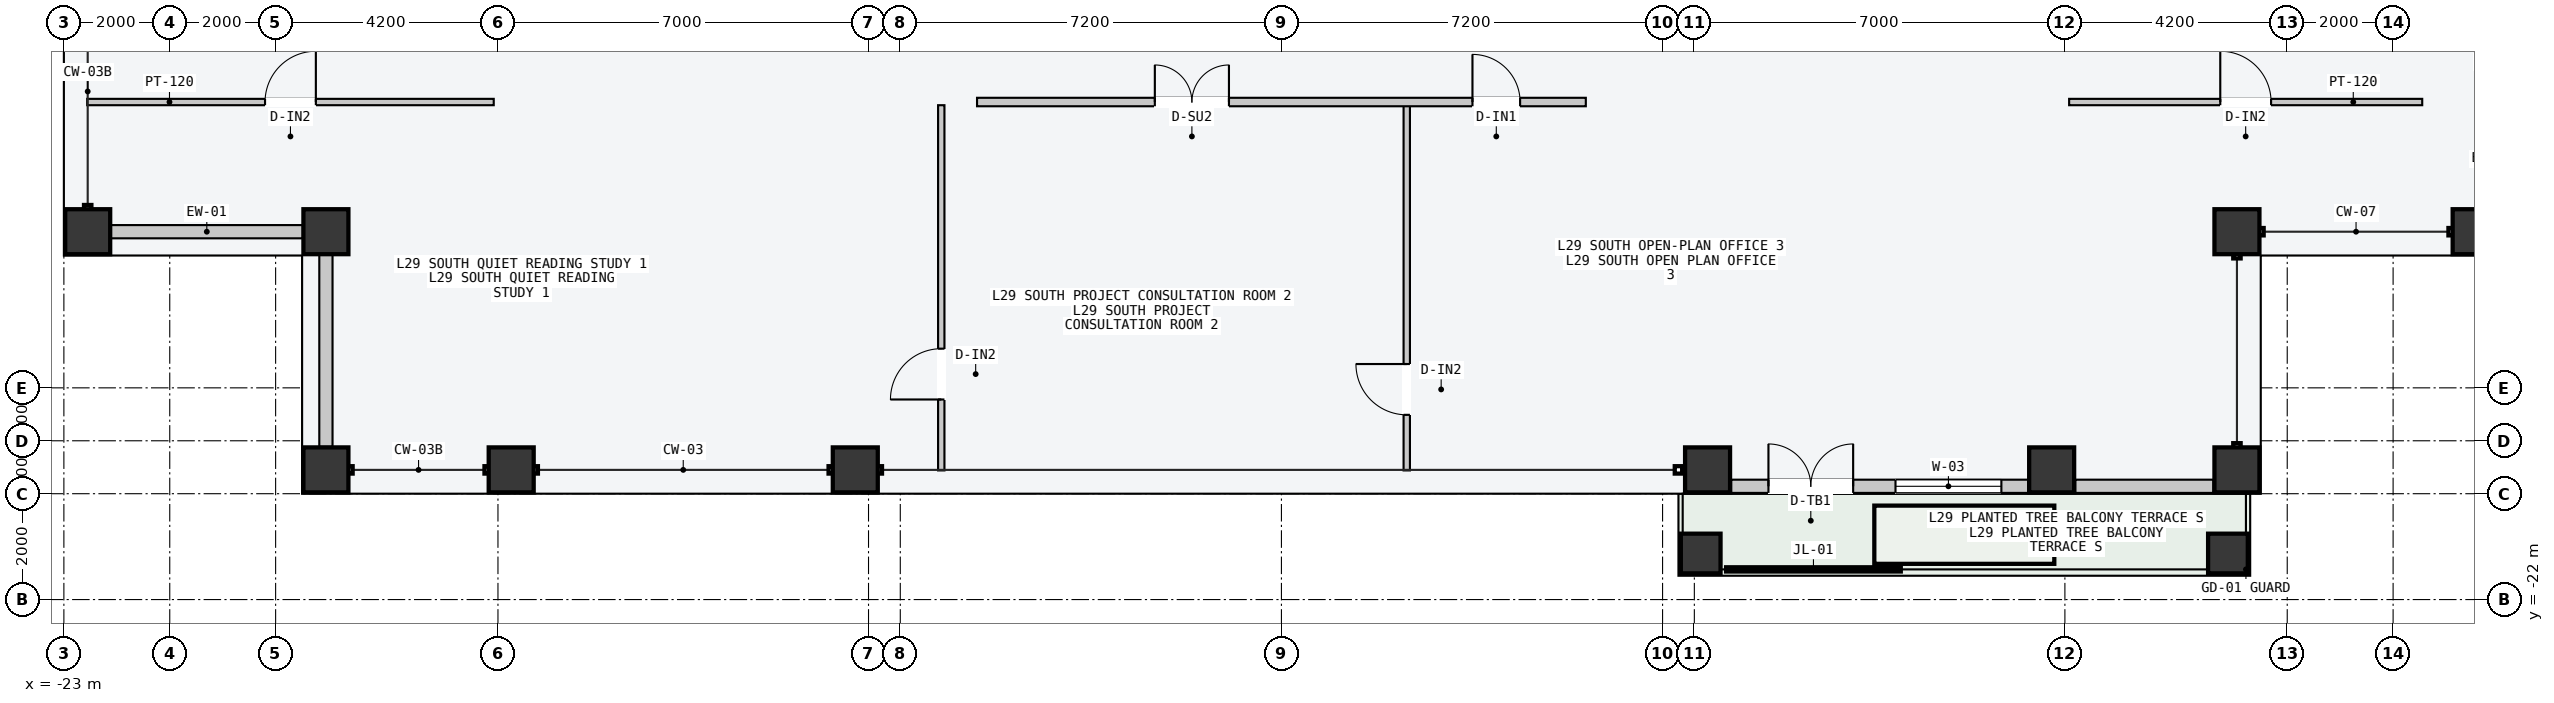
"""IFC4 building model, lengths in metres.
Left out: names, types, materials, properties, quantities, classifications, styles, units other than length and angle.
Written with IfcOpenShell. Run it as: python <this file> out.ifc"""

import sys

from ifc_helpers import new_model, si_unit, direction, frame, frame_2d, origin, origin_2d, place, context, subcontext, project, spatial, rectangle, hollow_rectangle, extrude, element, fill, save


model = new_model("IFC4")
c1 = context("Model", 3, precision=1e-05, world=origin(), true_north=direction((0.0, 1.0)))
c2 = subcontext(c1, "Body", "Model", "MODEL_VIEW")
j1 = project(units=[si_unit("LENGTHUNIT", "METRE"), si_unit("PLANEANGLEUNIT", "RADIAN")], contexts=[c1])
p1 = place(None, origin())
s1 = spatial("IfcSite", under=j1, at=p1, CompositionType="ELEMENT")
p2 = place(p1, origin())
s2 = spatial("IfcBuilding", under=s1, at=p2, CompositionType="ELEMENT")
p3 = place(p2, frame((0.0, 0.0, 113.4)))
s3 = spatial("IfcBuildingStorey", under=s2, at=p3, CompositionType="ELEMENT", Elevation=113.4)
for number, where, z_axis, x_axis in (
    (1, (-18.05, -19.55, 0.0), (0.0, 0.0, 1.0), (1.0, 0.0, 0.0)),
    (2, (-14.55, -19.55, 0.0), (0.0, 0.0, 1.0), (1.0, 0.0, 0.0)),
    (3, (-8.05, -19.55, 0.0), (0.0, 0.0, 1.0), (1.0, 0.0, 0.0)),
    (4, (8.05, -19.55, 0.0), (0.0, 0.0, 1.0), (1.0, 0.0, 0.0)),
    (5, (14.55, -19.55, 0.0), (0.0, 0.0, 1.0), (1.0, 0.0, 0.0)),
    (6, (18.05, -19.55, 0.0), (0.0, 0.0, 1.0), (1.0, 0.0, 0.0)),
    (7, (-22.55, -15.05, 0.0), (0.0, 0.0, 1.0), (0.0, 1.0, 0.0)),
    (8, (22.55, -15.05, 0.0), (0.0, 0.0, 1.0), (0.0, 1.0, 0.0)),
    (9, (18.05, -15.05, 0.0), (0.0, 0.0, 1.0), (1.0, 0.0, 0.0)),
    (10, (-18.05, -15.05, 0.0), (0.0, 0.0, 1.0), (1.0, 0.0, 0.0)),
):
    element("IfcColumn", number, at=place(p3, frame(where, z_axis=z_axis, x_axis=x_axis)), inside=s3, PredefinedType="COLUMN", context=c2, shape_type="SweptSolid", body=[
        extrude(hollow_rectangle(XDim=0.85, YDim=0.85, WallThickness=0.04, at=origin_2d()), origin(), (0.0, 0.0, 1.0), 3.6),
    ])
for number, where, z_axis, x_axis in (
    (11, (7.92, -21.13, 0.0), (0.0, 0.0, 1.0), (1.0, 0.0, 0.0)),
    (12, (17.88, -21.13, 0.0), (0.0, 0.0, 1.0), (1.0, 0.0, 0.0)),
):
    element("IfcColumn", number, at=place(p3, frame(where, z_axis=z_axis, x_axis=x_axis)), inside=s3, PredefinedType="COLUMN", context=c2, shape_type="SweptSolid", body=[
        extrude(hollow_rectangle(XDim=0.75, YDim=0.75, WallThickness=0.032, at=origin_2d()), origin(), (0.0, 0.0, 1.0), 3.6),
    ])
p4 = place(p3, frame((8.495, -19.86, 0.0), z_axis=(0.0, 0.0, 1.0), x_axis=(1.0, 0.0, 0.0)))
e13 = element("IfcWall", 13, at=p4, inside=s3, PredefinedType="STANDARD", context=c2, shape_type="SweptSolid", body=[
    extrude(rectangle(XDim=5.61, YDim=0.25, at=frame_2d((2.805, 0.0))), origin(), (0.0, 0.0, 1.0), 3.4),
])
p5 = place(p4, frame((0.705, 0.0, 0.0)))
e14 = element("IfcOpeningElement", 14, at=p5, cuts=e13, PredefinedType="OPENING", context=c2, shape_type="SweptSolid", body=[
    extrude(rectangle(XDim=1.6, YDim=2.2, at=frame_2d((0.8, 1.1))), frame((0.0, 0.135, 0.0), z_axis=(0.0, -1.0, 0.0), x_axis=(1.0, 0.0, 0.0)), (0.0, 0.0, 1.0), 0.27),
])
p6 = place(p4, frame((3.105, 0.0, 0.85)))
e15 = element("IfcOpeningElement", 15, at=p6, cuts=e13, PredefinedType="OPENING", context=c2, shape_type="SweptSolid", body=[
    extrude(rectangle(XDim=2.0, YDim=2.1, at=frame_2d((1.0, 1.05))), frame((0.0, 0.135, 0.0), z_axis=(0.0, -1.0, 0.0), x_axis=(1.0, 0.0, 0.0)), (0.0, 0.0, 1.0), 0.27),
])
p7 = place(p3, frame((14.995, -19.86, 0.0), z_axis=(0.0, 0.0, 1.0), x_axis=(1.0, 0.0, 0.0)))
e16 = element("IfcWall", 16, at=p7, inside=s3, PredefinedType="STANDARD", context=c2, shape_type="SweptSolid", body=[
    extrude(rectangle(XDim=2.61, YDim=0.25, at=frame_2d((1.305, 0.0))), origin(), (0.0, 0.0, 1.0), 3.4),
])
for number, where, z_axis, x_axis in (
    (17, (-22.115, -15.05, 0.0), (0.0, 0.0, 1.0), (1.0, 0.0, 0.0)),
    (18, (-18.05, -19.115, 0.0), (0.0, 0.0, 1.0), (0.0, 1.0, 0.0)),
):
    element("IfcWall", number, at=place(p3, frame(where, z_axis=z_axis, x_axis=x_axis)), inside=s3, PredefinedType="STANDARD", context=c2, shape_type="SweptSolid", body=[
        extrude(rectangle(XDim=3.63, YDim=0.25, at=frame_2d((1.815, 0.0))), origin(), (0.0, 0.0, 1.0), 2.75),
    ])
p8 = place(p3, frame((-6.426, -19.56, 0.0), z_axis=(0.0, 0.0, 1.0), x_axis=(0.0, 1.0, 0.0)))
e19 = element("IfcWall", 19, at=p8, inside=s3, PredefinedType="PARTITIONING", context=c2, shape_type="SweptSolid", body=[
    extrude(rectangle(XDim=6.9, YDim=0.12, at=frame_2d((3.45, 0.0))), origin(), (0.0, 0.0, 1.0), 3.4),
])
p9 = place(p8, frame((1.34, 0.0, 0.0)))
e20 = element("IfcOpeningElement", 20, at=p9, cuts=e19, PredefinedType="OPENING", context=c2, shape_type="SweptSolid", body=[
    extrude(rectangle(XDim=0.96, YDim=2.18, at=frame_2d((0.48, 1.09))), frame((0.0, 0.07, 0.0), z_axis=(0.0, -1.0, 0.0), x_axis=(1.0, 0.0, 0.0)), (0.0, 0.0, 1.0), 0.14),
])
p10 = place(p3, frame((2.367, -19.56, 0.0), z_axis=(0.0, 0.0, 1.0), x_axis=(0.0, 1.0, 0.0)))
e21 = element("IfcWall", 21, at=p10, inside=s3, PredefinedType="PARTITIONING", context=c2, shape_type="SweptSolid", body=[
    extrude(rectangle(XDim=6.9, YDim=0.12, at=frame_2d((3.45, 0.0))), origin(), (0.0, 0.0, 1.0), 3.4),
])
p11 = place(p10, frame((1.05, 0.0, 0.0)))
e22 = element("IfcOpeningElement", 22, at=p11, cuts=e21, PredefinedType="OPENING", context=c2, shape_type="SweptSolid", body=[
    extrude(rectangle(XDim=0.96, YDim=2.18, at=frame_2d((0.48, 1.09))), frame((0.0, 0.07, 0.0), z_axis=(0.0, -1.0, 0.0), x_axis=(1.0, 0.0, 0.0)), (0.0, 0.0, 1.0), 0.14),
])
p12 = place(p3, frame((-5.75, -12.6, 0.0), z_axis=(0.0, 0.0, 1.0), x_axis=(1.0, 0.0, 0.0)))
e23 = element("IfcWall", 23, at=p12, inside=s3, PredefinedType="PARTITIONING", context=c2, shape_type="SweptSolid", body=[
    extrude(rectangle(XDim=11.5, YDim=0.16, at=frame_2d((5.75, 0.0))), origin(), (0.0, 0.0, 1.0), 3.4),
])
p13 = place(p12, frame((3.359, 0.0, 0.0)))
e24 = element("IfcOpeningElement", 24, at=p13, cuts=e23, PredefinedType="OPENING", context=c2, shape_type="SweptSolid", body=[
    extrude(rectangle(XDim=1.4, YDim=2.2, at=frame_2d((0.7, 1.1))), frame((0.0, 0.09, 0.0), z_axis=(0.0, -1.0, 0.0), x_axis=(1.0, 0.0, 0.0)), (0.0, 0.0, 1.0), 0.18),
])
p14 = place(p12, frame((9.359, 0.0, 0.0)))
e25 = element("IfcOpeningElement", 25, at=p14, cuts=e23, PredefinedType="OPENING", context=c2, shape_type="SweptSolid", body=[
    extrude(rectangle(XDim=0.9, YDim=2.15, at=frame_2d((0.45, 1.075))), frame((0.0, 0.09, 0.0), z_axis=(0.0, -1.0, 0.0), x_axis=(1.0, 0.0, 0.0)), (0.0, 0.0, 1.0), 0.18),
])
p15 = place(p3, frame((-22.56, -12.6, 0.0), z_axis=(0.0, 0.0, 1.0), x_axis=(1.0, 0.0, 0.0)))
e26 = element("IfcWall", 26, at=p15, inside=s3, PredefinedType="PARTITIONING", context=c2, shape_type="SweptSolid", body=[
    extrude(rectangle(XDim=7.68, YDim=0.12, at=frame_2d((3.84, 0.0))), origin(), (0.0, 0.0, 1.0), 3.4),
])
p16 = place(p15, frame((3.36, 0.0, 0.0)))
e27 = element("IfcOpeningElement", 27, at=p16, cuts=e26, PredefinedType="OPENING", context=c2, shape_type="SweptSolid", body=[
    extrude(rectangle(XDim=0.96, YDim=2.18, at=frame_2d((0.48, 1.09))), frame((0.0, 0.07, 0.0), z_axis=(0.0, -1.0, 0.0), x_axis=(1.0, 0.0, 0.0)), (0.0, 0.0, 1.0), 0.14),
])
p17 = place(p3, frame((14.88, -12.6, 0.0), z_axis=(0.0, 0.0, 1.0), x_axis=(1.0, 0.0, 0.0)))
e28 = element("IfcWall", 28, at=p17, inside=s3, PredefinedType="PARTITIONING", context=c2, shape_type="SweptSolid", body=[
    extrude(rectangle(XDim=6.67, YDim=0.12, at=frame_2d((3.335, 0.0))), origin(), (0.0, 0.0, 1.0), 3.4),
])
p18 = place(p17, frame((2.855, 0.0, 0.0)))
e29 = element("IfcOpeningElement", 29, at=p18, cuts=e28, PredefinedType="OPENING", context=c2, shape_type="SweptSolid", body=[
    extrude(rectangle(XDim=0.96, YDim=2.18, at=frame_2d((0.48, 1.09))), frame((0.0, 0.07, 0.0), z_axis=(0.0, -1.0, 0.0), x_axis=(1.0, 0.0, 0.0)), (0.0, 0.0, 1.0), 0.14),
])
p19 = place(p5, origin())
e30 = element("IfcDoor", 30, at=p19, inside=s3, OperationType="DOUBLE_DOOR_SINGLE_SWING", PredefinedType="DOOR", context=c2, shape_type="SweptSolid", body=[
    extrude(rectangle(XDim=1.6, YDim=2.2, at=frame_2d((0.8, 1.1))), frame((0.0, 0.025, 0.0), z_axis=(0.0, -1.0, 0.0), x_axis=(1.0, 0.0, 0.0)), (0.0, 0.0, 1.0), 0.05),
])
fill(e14, e30)
p20 = place(p6, origin())
e31 = element("IfcWindow", 31, at=p20, inside=s3, PartitioningType="SINGLE_PANEL", PredefinedType="WINDOW", context=c2, shape_type="SweptSolid", body=[
    extrude(rectangle(XDim=2.0, YDim=2.1, at=frame_2d((1.0, 1.05))), frame((0.0, 0.03, 0.0), z_axis=(0.0, -1.0, 0.0), x_axis=(1.0, 0.0, 0.0)), (0.0, 0.0, 1.0), 0.06),
])
fill(e15, e31)
p21 = place(p9, origin())
e32 = element("IfcDoor", 32, at=p21, inside=s3, OperationType="SINGLE_SWING_LEFT", PredefinedType="DOOR", context=c2, shape_type="SweptSolid", body=[
    extrude(rectangle(XDim=0.96, YDim=2.18, at=frame_2d((0.48, 1.09))), frame((0.0, 0.025, 0.0), z_axis=(0.0, -1.0, 0.0), x_axis=(1.0, 0.0, 0.0)), (0.0, 0.0, 1.0), 0.05),
])
fill(e20, e32)
p22 = place(p11, origin())
e33 = element("IfcDoor", 33, at=p22, inside=s3, OperationType="SINGLE_SWING_RIGHT", PredefinedType="DOOR", context=c2, shape_type="SweptSolid", body=[
    extrude(rectangle(XDim=0.96, YDim=2.18, at=frame_2d((0.48, 1.09))), frame((0.0, 0.025, 0.0), z_axis=(0.0, -1.0, 0.0), x_axis=(1.0, 0.0, 0.0)), (0.0, 0.0, 1.0), 0.05),
])
fill(e22, e33)
p23 = place(p13, origin())
e34 = element("IfcDoor", 34, at=p23, inside=s3, OperationType="DOUBLE_DOOR_SINGLE_SWING", PredefinedType="DOOR", context=c2, shape_type="SweptSolid", body=[
    extrude(rectangle(XDim=1.4, YDim=2.2, at=frame_2d((0.7, 1.1))), frame((0.0, 0.025, 0.0), z_axis=(0.0, -1.0, 0.0), x_axis=(1.0, 0.0, 0.0)), (0.0, 0.0, 1.0), 0.05),
])
fill(e24, e34)
p24 = place(p14, origin())
e35 = element("IfcDoor", 35, at=p24, inside=s3, OperationType="SINGLE_SWING_LEFT", PredefinedType="DOOR", context=c2, shape_type="SweptSolid", body=[
    extrude(rectangle(XDim=0.9, YDim=2.15, at=frame_2d((0.45, 1.075))), frame((0.0, 0.025, 0.0), z_axis=(0.0, -1.0, 0.0), x_axis=(1.0, 0.0, 0.0)), (0.0, 0.0, 1.0), 0.05),
])
fill(e25, e35)
p25 = place(p16, origin())
e36 = element("IfcDoor", 36, at=p25, inside=s3, OperationType="SINGLE_SWING_RIGHT", PredefinedType="DOOR", context=c2, shape_type="SweptSolid", body=[
    extrude(rectangle(XDim=0.96, YDim=2.18, at=frame_2d((0.48, 1.09))), frame((0.0, 0.025, 0.0), z_axis=(0.0, -1.0, 0.0), x_axis=(1.0, 0.0, 0.0)), (0.0, 0.0, 1.0), 0.05),
])
fill(e27, e36)
p26 = place(p18, origin())
e37 = element("IfcDoor", 37, at=p26, inside=s3, OperationType="SINGLE_SWING_LEFT", PredefinedType="DOOR", context=c2, shape_type="SweptSolid", body=[
    extrude(rectangle(XDim=0.96, YDim=2.18, at=frame_2d((0.48, 1.09))), frame((0.0, 0.025, 0.0), z_axis=(0.0, -1.0, 0.0), x_axis=(1.0, 0.0, 0.0)), (0.0, 0.0, 1.0), 0.05),
])
fill(e29, e37)
save(model, sys.argv[1])
